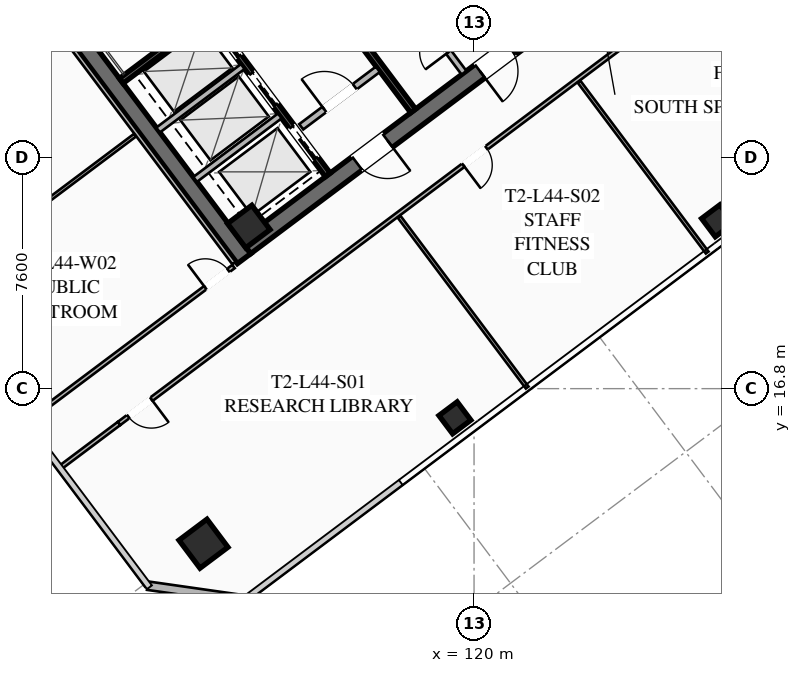
"""IFC4 building model, lengths in metres.
Left out: names, types, materials, properties, quantities, classifications, styles, units other than length and angle.
Written with IfcOpenShell. Run it as: python <this file> out.ifc"""

import sys

from ifc_helpers import new_model, si_unit, direction, frame, frame_2d, origin, origin_2d, place, context, subcontext, project, spatial, rectangle, hollow_rectangle, extrude, element, fill, save


model = new_model("IFC4")
c1 = context("Model", 3, precision=1e-05, world=origin(), true_north=direction((0.0, 1.0)))
c2 = subcontext(c1, "Body", "Model", "MODEL_VIEW")
j1 = project(units=[si_unit("LENGTHUNIT", "METRE"), si_unit("PLANEANGLEUNIT", "RADIAN")], contexts=[c1])
p1 = place(None, origin())
s1 = spatial("IfcSite", under=j1, at=p1, CompositionType="ELEMENT")
p2 = place(p1, origin())
s2 = spatial("IfcBuilding", under=s1, at=p2, CompositionType="ELEMENT")
p3 = place(p2, frame((0.0, 0.0, 164.1)))
s3 = spatial("IfcBuildingStorey", under=s2, at=p3, CompositionType="ELEMENT", Elevation=164.1)
p4 = place(p3, frame((112.436, 21.077, 0.0), z_axis=(0.0, 0.0, 1.0), x_axis=(-0.600005007985, 0.799996243986, 0.0)))
e1 = element("IfcWall", 1, at=p4, inside=s3, PredefinedType="SHEAR", context=c2, shape_type="SweptSolid", body=[
    extrude(rectangle(XDim=15.6, YDim=0.55, at=frame_2d((7.8, 0.0))), origin(), (0.0, 0.0, 1.0), 3.55),
])
p5 = place(p3, frame((124.539, 30.498, 0.0), z_axis=(0.0, 0.0, 1.0), x_axis=(-0.799998054672, -0.600002593761, 0.0)))
e2 = element("IfcWall", 2, at=p5, inside=s3, PredefinedType="SHEAR", context=c2, shape_type="SweptSolid", body=[
    extrude(rectangle(XDim=15.06, YDim=0.55, at=frame_2d((7.53, 0.0))), origin(), (0.0, 0.0, 1.0), 3.55),
])
p6 = place(p5, frame((9.23, 0.0, 0.0)))
e3 = element("IfcOpeningElement", 3, at=p6, cuts=e2, PredefinedType="OPENING", context=c2, shape_type="SweptSolid", body=[
    extrude(rectangle(XDim=1.25, YDim=2.25, at=frame_2d((0.625, 1.125))), frame((0.0, 0.285, 0.0), z_axis=(0.0, -1.0, 0.0), x_axis=(1.0, 0.0, 0.0)), (0.0, 0.0, 1.0), 0.57),
])
p7 = place(p5, frame((4.18, 0.0, 0.0)))
e4 = element("IfcOpeningElement", 4, at=p7, cuts=e2, PredefinedType="OPENING", context=c2, shape_type="SweptSolid", body=[
    extrude(rectangle(XDim=1.25, YDim=2.25, at=frame_2d((0.625, 1.125))), frame((0.0, 0.285, 0.0), z_axis=(0.0, -1.0, 0.0), x_axis=(1.0, 0.0, 0.0)), (0.0, 0.0, 1.0), 0.57),
])
p8 = place(p3, frame((112.59, 22.13, 0.0), z_axis=(0.0, 0.0, 1.0), x_axis=(0.799999996291, 0.600000004945, 0.0)))
e5 = element("IfcColumn", 5, at=p8, inside=s3, PredefinedType="COLUMN", context=c2, shape_type="SweptSolid", body=[
    extrude(hollow_rectangle(XDim=1.0, YDim=1.0, WallThickness=0.04, at=origin_2d()), origin(), (0.0, 0.0, 1.0), 3.37),
])
p9 = place(p3, frame((111.1, 11.7, 0.0), z_axis=(0.0, 0.0, 1.0), x_axis=(0.799999996291, 0.600000004945, 0.0)))
e6 = element("IfcColumn", 6, at=p9, inside=s3, PredefinedType="COLUMN", context=c2, shape_type="SweptSolid", body=[
    extrude(hollow_rectangle(XDim=1.15, YDim=1.15, WallThickness=0.045, at=origin_2d()), origin(), (0.0, 0.0, 1.0), 3.37),
])
for number, where, z_axis, x_axis in (
    (7, (119.37, 15.84, 0.0), (0.0, 0.0, 1.0), (0.8, 0.6, 0.0)),
    (8, (128.01, 22.32, 0.0), (0.0, 0.0, 1.0), (0.8, 0.6, 0.0)),
):
    element("IfcColumn", number, at=place(p3, frame(where, z_axis=z_axis, x_axis=x_axis)), inside=s3, PredefinedType="COLUMN", context=c2, shape_type="SweptSolid", body=[
        extrude(hollow_rectangle(XDim=0.75, YDim=0.75, WallThickness=0.032, at=origin_2d()), origin(), (0.0, 0.0, 1.0), 3.37),
    ])
p10 = place(p3, frame((112.48, 9.86, 0.0), z_axis=(0.0, 0.0, 1.0), x_axis=(-0.989950994782, 0.141410847992, 0.0)))
e9 = element("IfcWall", 9, at=p10, inside=s3, PredefinedType="SOLIDWALL", context=c2, shape_type="SweptSolid", body=[
    extrude(rectangle(XDim=3.253, YDim=0.28, at=frame_2d((1.626, 0.0))), origin(), (0.0, 0.0, 1.0), 3.37),
])
p11 = place(p3, frame((108.396, 26.922, 0.0), z_axis=(0.0, 0.0, 1.0), x_axis=(0.800015298837, 0.599979601008, 0.0)))
e10 = element("IfcWall", 10, at=p11, inside=s3, PredefinedType="SHEAR", context=c2, shape_type="SweptSolid", body=[
    extrude(rectangle(XDim=3.83, YDim=0.2, at=frame_2d((1.915, 0.0))), origin(), (0.0, 0.0, 1.0), 3.37),
])
p12 = place(p3, frame((117.998, 25.936, 0.0), z_axis=(0.0, 0.0, 1.0), x_axis=(-0.600002693989, 0.799997979501, 0.0)))
e11 = element("IfcWall", 11, at=p12, inside=s3, PredefinedType="SHEAR", context=c2, shape_type="SweptSolid", body=[
    extrude(rectangle(XDim=14.5, YDim=0.2, at=frame_2d((7.25, 0.0))), origin(), (0.0, 0.0, 1.0), 3.37),
])
p13 = place(p3, frame((114.316, 25.412, 0.0), z_axis=(0.0, 0.0, 1.0), x_axis=(0.800018601094, 0.59997519774, 0.0)))
e12 = element("IfcWall", 12, at=p13, inside=s3, PredefinedType="SOLIDWALL", context=c2, shape_type="SweptSolid", body=[
    extrude(rectangle(XDim=3.15, YDim=0.22, at=frame_2d((1.575, 0.0))), origin(), (0.0, 0.0, 1.0), 2.723),
])
p14 = place(p13, frame((0.95, 0.0, 0.0)))
e13 = element("IfcOpeningElement", 13, at=p14, cuts=e12, PredefinedType="OPENING", context=c2, shape_type="SweptSolid", body=[
    extrude(rectangle(XDim=1.25, YDim=2.25, at=frame_2d((0.625, 1.125))), frame((0.0, 0.12, 0.0), z_axis=(0.0, -1.0, 0.0), x_axis=(1.0, 0.0, 0.0)), (0.0, 0.0, 1.0), 0.24),
])
p15 = place(p3, frame((115.19, 23.83, 0.0), z_axis=(0.0, 0.0, 1.0), x_axis=(-0.599993943644, 0.800004542231, 0.0)))
e14 = element("IfcWall", 14, at=p15, inside=s3, PredefinedType="SHEAR", context=c2, shape_type="SweptSolid", body=[
    extrude(rectangle(XDim=6.45, YDim=0.2, at=frame_2d((3.225, 0.0))), origin(), (0.0, 0.0, 1.0), 3.37),
])
p16 = place(p15, frame((4.875, 0.0, 0.0)))
e15 = element("IfcOpeningElement", 15, at=p16, cuts=e14, PredefinedType="OPENING", context=c2, shape_type="SweptSolid", body=[
    extrude(rectangle(XDim=1.3, YDim=2.25, at=frame_2d((0.65, 1.125))), frame((0.0, 0.11, 0.0), z_axis=(0.0, -1.0, 0.0), x_axis=(1.0, 0.0, 0.0)), (0.0, 0.0, 1.0), 0.22),
])
p17 = place(p15, frame((2.875, 0.0, 0.0)))
e16 = element("IfcOpeningElement", 16, at=p17, cuts=e14, PredefinedType="OPENING", context=c2, shape_type="SweptSolid", body=[
    extrude(rectangle(XDim=1.3, YDim=2.25, at=frame_2d((0.65, 1.125))), frame((0.0, 0.11, 0.0), z_axis=(0.0, -1.0, 0.0), x_axis=(1.0, 0.0, 0.0)), (0.0, 0.0, 1.0), 0.22),
])
p18 = place(p15, frame((0.675, 0.0, 0.0)))
e17 = element("IfcOpeningElement", 17, at=p18, cuts=e14, PredefinedType="OPENING", context=c2, shape_type="SweptSolid", body=[
    extrude(rectangle(XDim=1.3, YDim=2.25, at=frame_2d((0.65, 1.125))), frame((0.0, 0.11, 0.0), z_axis=(0.0, -1.0, 0.0), x_axis=(1.0, 0.0, 0.0)), (0.0, 0.0, 1.0), 0.22),
])
for number, where, z_axis, x_axis in (
    (18, (110.826, 23.682, 0.0), (0.0, 0.0, 1.0), (0.8, 0.6, 0.0)),
    (19, (109.608, 25.306, 0.0), (0.0, 0.0, 1.0), (0.8, 0.6, 0.0)),
):
    element("IfcWall", number, at=place(p3, frame(where, z_axis=z_axis, x_axis=x_axis)), inside=s3, PredefinedType="SOLIDWALL", context=c2, shape_type="SweptSolid", body=[
        extrude(rectangle(XDim=3.48, YDim=0.2, at=frame_2d((1.74, 0.0))), origin(), (0.0, 0.0, 1.0), 3.37),
    ])
p19 = place(p3, frame((119.67, 27.19, 0.0), z_axis=(0.0, 0.0, 1.0), x_axis=(-0.599988677396, 0.800008491828, 0.0)))
e20 = element("IfcWall", 20, at=p19, inside=s3, PredefinedType="SOLIDWALL", context=c2, shape_type="SweptSolid", body=[
    extrude(rectangle(XDim=6.9, YDim=0.2, at=frame_2d((3.45, 0.0))), origin(), (0.0, 0.0, 1.0), 2.723),
])
p20 = place(p19, frame((0.85, 0.0, 0.0)))
e21 = element("IfcOpeningElement", 21, at=p20, cuts=e20, PredefinedType="OPENING", context=c2, shape_type="SweptSolid", body=[
    extrude(rectangle(XDim=0.95, YDim=2.05, at=frame_2d((0.475, 1.025))), frame((0.0, 0.11, 0.0), z_axis=(0.0, -1.0, 0.0), x_axis=(1.0, 0.0, 0.0)), (0.0, 0.0, 1.0), 0.22),
])
p21 = place(p19, frame((4.8, 0.0, 0.0)))
e22 = element("IfcOpeningElement", 22, at=p21, cuts=e20, PredefinedType="OPENING", context=c2, shape_type="SweptSolid", body=[
    extrude(rectangle(XDim=1.05, YDim=2.2, at=frame_2d((0.525, 1.1))), frame((0.0, 0.11, 0.0), z_axis=(0.0, -1.0, 0.0), x_axis=(1.0, 0.0, 0.0)), (0.0, 0.0, 1.0), 0.22),
])
p22 = place(p3, frame((131.282, 32.874, 0.0), z_axis=(0.0, 0.0, 1.0), x_axis=(-0.8, -0.6, 0.0)))
e23 = element("IfcWall", 23, at=p22, inside=s3, PredefinedType="PARTITIONING", context=c2, shape_type="SweptSolid", body=[
    extrude(rectangle(XDim=28.7, YDim=0.135, at=frame_2d((14.35, 0.0))), origin(), (0.0, 0.0, 1.0), 2.723),
])
p23 = place(p22, frame((27.37, 0.0, 0.0)))
e24 = element("IfcOpeningElement", 24, at=p23, cuts=e23, PredefinedType="OPENING", context=c2, shape_type="SweptSolid", body=[
    extrude(rectangle(XDim=0.95, YDim=2.05, at=frame_2d((0.475, 1.025))), frame((0.0, 0.077, 0.0), z_axis=(0.0, -1.0, 0.0), x_axis=(1.0, 0.0, 0.0)), (0.0, 0.0, 1.0), 0.155),
])
p24 = place(p22, frame((13.592, 0.0, 0.0)))
e25 = element("IfcOpeningElement", 25, at=p24, cuts=e23, PredefinedType="OPENING", context=c2, shape_type="SweptSolid", body=[
    extrude(rectangle(XDim=0.95, YDim=2.05, at=frame_2d((0.475, 1.025))), frame((0.0, 0.077, 0.0), z_axis=(0.0, -1.0, 0.0), x_axis=(1.0, 0.0, 0.0)), (0.0, 0.0, 1.0), 0.155),
])
p25 = place(p22, frame((0.38, 0.0, 0.0)))
e26 = element("IfcOpeningElement", 26, at=p25, cuts=e23, PredefinedType="OPENING", context=c2, shape_type="SweptSolid", body=[
    extrude(rectangle(XDim=0.95, YDim=2.05, at=frame_2d((0.475, 1.025))), frame((0.0, 0.077, 0.0), z_axis=(0.0, -1.0, 0.0), x_axis=(1.0, 0.0, 0.0)), (0.0, 0.0, 1.0), 0.155),
])
p26 = place(p3, frame((106.378, 14.196, 0.0), z_axis=(0.0, 0.0, 1.0), x_axis=(0.800012055778, 0.599983925293, 0.0)))
e27 = element("IfcWall", 27, at=p26, inside=s3, PredefinedType="PARTITIONING", context=c2, shape_type="SweptSolid", body=[
    extrude(rectangle(XDim=2.43, YDim=0.135, at=frame_2d((1.215, 0.0))), origin(), (0.0, 0.0, 1.0), 2.723),
])
for number, where, z_axis, x_axis in (
    (28, (121.748, 16.836, 0.0), (0.0, 0.0, 1.0), (-0.6, 0.8, 0.0)),
    (29, (127.668, 21.276, 0.0), (0.0, 0.0, 1.0), (-0.6, 0.8, 0.0)),
):
    element("IfcWall", number, at=place(p3, frame(where, z_axis=z_axis, x_axis=x_axis)), inside=s3, PredefinedType="PARTITIONING", context=c2, shape_type="SweptSolid", body=[
        extrude(rectangle(XDim=7.03, YDim=0.11, at=frame_2d((3.515, 0.0))), origin(), (0.0, 0.0, 1.0), 2.723),
    ])
p27 = place(p3, frame((112.104, 20.928, 0.0), z_axis=(0.0, 0.0, 1.0), x_axis=(-0.599994940075, 0.800003794918, 0.0)))
e30 = element("IfcWall", 30, at=p27, inside=s3, PredefinedType="PARTITIONING", context=c2, shape_type="SweptSolid", body=[
    extrude(rectangle(XDim=15.44, YDim=0.135, at=frame_2d((7.72, 0.0))), origin(), (0.0, 0.0, 1.0), 2.723),
])
p28 = place(p3, frame((105.256, 15.692, 0.0), z_axis=(0.0, 0.0, 1.0), x_axis=(0.799989708052, 0.600013722352, 0.0)))
e31 = element("IfcWall", 31, at=p28, inside=s3, PredefinedType="PARTITIONING", context=c2, shape_type="SweptSolid", body=[
    extrude(rectangle(XDim=8.54, YDim=0.135, at=frame_2d((4.27, 0.0))), origin(), (0.0, 0.0, 1.0), 2.723),
])
p29 = place(p28, frame((7.38, 0.0, 0.0)))
e32 = element("IfcOpeningElement", 32, at=p29, cuts=e31, PredefinedType="OPENING", context=c2, shape_type="SweptSolid", body=[
    extrude(rectangle(XDim=0.95, YDim=2.05, at=frame_2d((0.475, 1.025))), frame((0.0, 0.077, 0.0), z_axis=(0.0, -1.0, 0.0), x_axis=(1.0, 0.0, 0.0)), (0.0, 0.0, 1.0), 0.155),
])
p30 = place(p3, frame((102.016, 20.012, 0.0), z_axis=(0.0, 0.0, 1.0), x_axis=(0.799989708052, 0.600013722352, 0.0)))
e33 = element("IfcWall", 33, at=p30, inside=s3, PredefinedType="PARTITIONING", context=c2, shape_type="SweptSolid", body=[
    extrude(rectangle(XDim=8.54, YDim=0.11, at=frame_2d((4.27, 0.0))), origin(), (0.0, 0.0, 1.0), 2.723),
])
p31 = place(p6, origin())
e34 = element("IfcDoor", 34, at=p31, inside=s3, OperationType="SINGLE_SWING_LEFT", PredefinedType="DOOR", context=c2, shape_type="SweptSolid", body=[
    extrude(rectangle(XDim=1.25, YDim=2.25, at=frame_2d((0.625, 1.125))), frame((0.0, 0.025, 0.0), z_axis=(0.0, -1.0, 0.0), x_axis=(1.0, 0.0, 0.0)), (0.0, 0.0, 1.0), 0.05),
])
fill(e3, e34)
p32 = place(p7, origin())
e35 = element("IfcDoor", 35, at=p32, inside=s3, OperationType="SINGLE_SWING_RIGHT", PredefinedType="DOOR", context=c2, shape_type="SweptSolid", body=[
    extrude(rectangle(XDim=1.25, YDim=2.25, at=frame_2d((0.625, 1.125))), frame((0.0, 0.025, 0.0), z_axis=(0.0, -1.0, 0.0), x_axis=(1.0, 0.0, 0.0)), (0.0, 0.0, 1.0), 0.05),
])
fill(e4, e35)
p33 = place(p14, origin())
e36 = element("IfcDoor", 36, at=p33, inside=s3, OperationType="SINGLE_SWING_LEFT", PredefinedType="DOOR", context=c2, shape_type="SweptSolid", body=[
    extrude(rectangle(XDim=1.25, YDim=2.25, at=frame_2d((0.625, 1.125))), frame((0.0, 0.025, 0.0), z_axis=(0.0, -1.0, 0.0), x_axis=(1.0, 0.0, 0.0)), (0.0, 0.0, 1.0), 0.05),
])
fill(e13, e36)
p34 = place(p23, origin())
e37 = element("IfcDoor", 37, at=p34, inside=s3, OperationType="SINGLE_SWING_LEFT", PredefinedType="DOOR", context=c2, shape_type="SweptSolid", body=[
    extrude(rectangle(XDim=0.95, YDim=2.05, at=frame_2d((0.475, 1.025))), frame((0.0, 0.025, 0.0), z_axis=(0.0, -1.0, 0.0), x_axis=(1.0, 0.0, 0.0)), (0.0, 0.0, 1.0), 0.05),
])
fill(e24, e37)
p35 = place(p24, origin())
e38 = element("IfcDoor", 38, at=p35, inside=s3, OperationType="SINGLE_SWING_RIGHT", PredefinedType="DOOR", context=c2, shape_type="SweptSolid", body=[
    extrude(rectangle(XDim=0.95, YDim=2.05, at=frame_2d((0.475, 1.025))), frame((0.0, 0.025, 0.0), z_axis=(0.0, -1.0, 0.0), x_axis=(1.0, 0.0, 0.0)), (0.0, 0.0, 1.0), 0.05),
])
fill(e25, e38)
p36 = place(p29, origin())
e39 = element("IfcDoor", 39, at=p36, inside=s3, OperationType="SINGLE_SWING_LEFT", PredefinedType="DOOR", context=c2, shape_type="SweptSolid", body=[
    extrude(rectangle(XDim=0.95, YDim=2.05, at=frame_2d((0.475, 1.025))), frame((0.0, 0.025, 0.0), z_axis=(0.0, -1.0, 0.0), x_axis=(1.0, 0.0, 0.0)), (0.0, 0.0, 1.0), 0.05),
])
fill(e32, e39)
p37 = place(p16, origin())
e40 = element("IfcDoor", 40, at=p37, inside=s3, OperationType="SLIDING_TO_LEFT", PredefinedType="DOOR", context=c2, shape_type="SweptSolid", body=[
    extrude(rectangle(XDim=1.3, YDim=2.25, at=frame_2d((0.65, 1.125))), frame((0.0, 0.025, 0.0), z_axis=(0.0, -1.0, 0.0), x_axis=(1.0, 0.0, 0.0)), (0.0, 0.0, 1.0), 0.05),
])
fill(e15, e40)
p38 = place(p17, origin())
e41 = element("IfcDoor", 41, at=p38, inside=s3, OperationType="SLIDING_TO_LEFT", PredefinedType="DOOR", context=c2, shape_type="SweptSolid", body=[
    extrude(rectangle(XDim=1.3, YDim=2.25, at=frame_2d((0.65, 1.125))), frame((0.0, 0.025, 0.0), z_axis=(0.0, -1.0, 0.0), x_axis=(1.0, 0.0, 0.0)), (0.0, 0.0, 1.0), 0.05),
])
fill(e16, e41)
p39 = place(p18, origin())
e42 = element("IfcDoor", 42, at=p39, inside=s3, OperationType="SLIDING_TO_LEFT", PredefinedType="DOOR", context=c2, shape_type="SweptSolid", body=[
    extrude(rectangle(XDim=1.3, YDim=2.25, at=frame_2d((0.65, 1.125))), frame((0.0, 0.025, 0.0), z_axis=(0.0, -1.0, 0.0), x_axis=(1.0, 0.0, 0.0)), (0.0, 0.0, 1.0), 0.05),
])
fill(e17, e42)
save(model, sys.argv[1])
